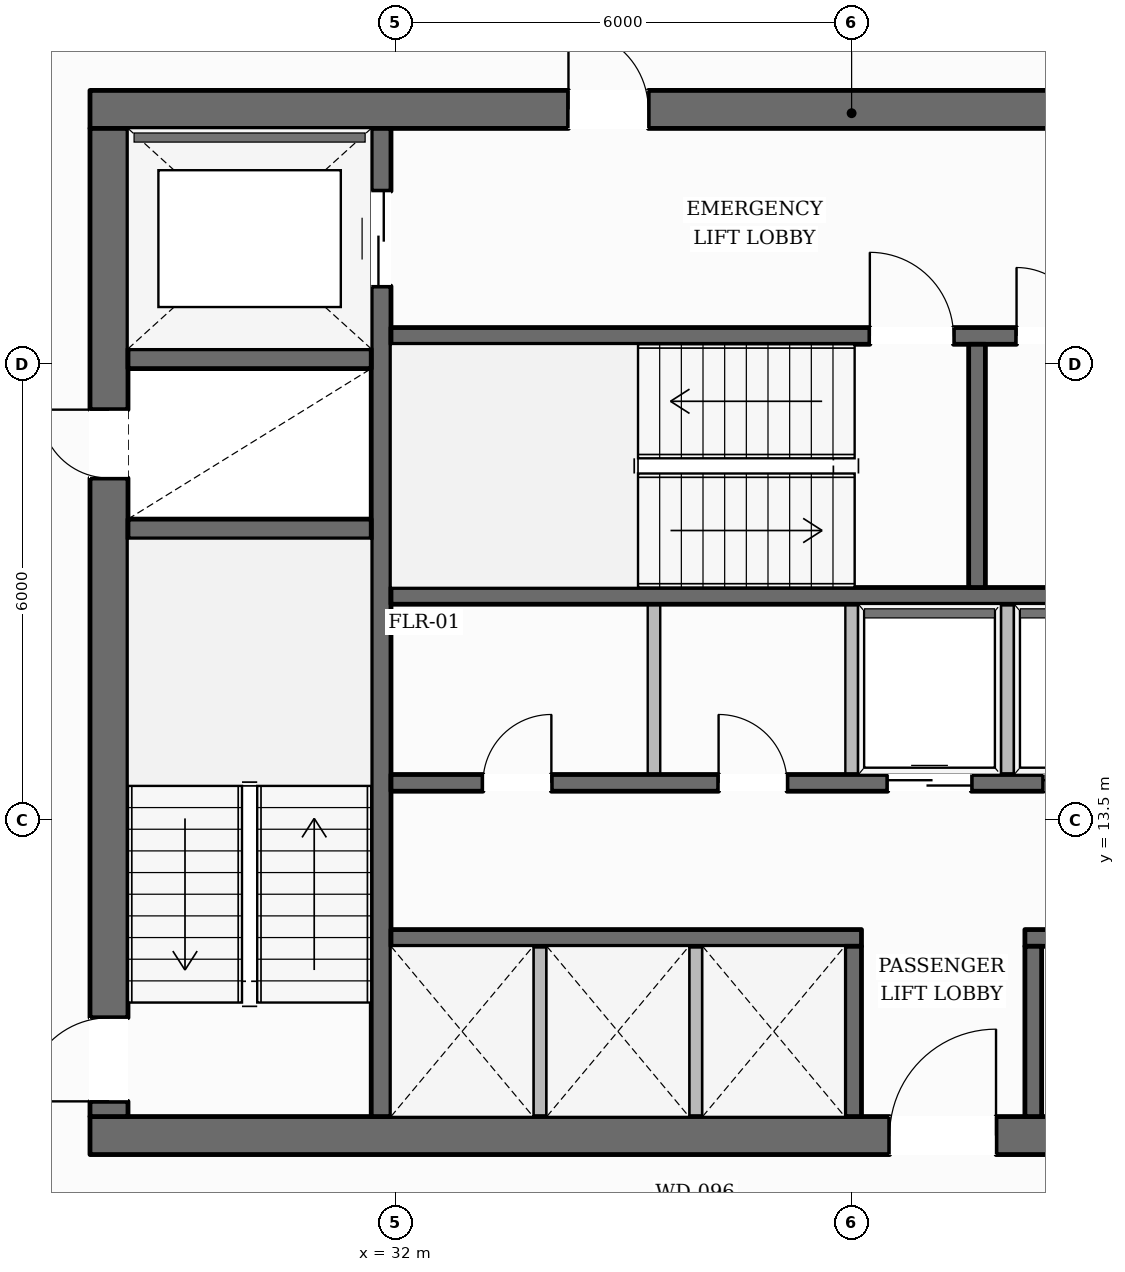
"""IFC4 building model, lengths in metres.
Left out: names, types, materials, properties, quantities, classifications, styles, units other than length and angle.
Written with IfcOpenShell. Run it as: python <this file> out.ifc"""

import sys

from ifc_helpers import new_model, si_unit, direction, frame, frame_2d, origin, place, context, subcontext, project, spatial, rectangle, extrude, element, fill, save


model = new_model("IFC4")
c1 = context("Model", 3, precision=1e-05, world=origin(), true_north=direction((0.0, 1.0)))
c2 = subcontext(c1, "Body", "Model", "MODEL_VIEW")
j1 = project(units=[si_unit("LENGTHUNIT", "METRE"), si_unit("PLANEANGLEUNIT", "RADIAN")], contexts=[c1])
p1 = place(None, origin())
s1 = spatial("IfcSite", under=j1, at=p1, CompositionType="ELEMENT")
p2 = place(p1, origin())
s2 = spatial("IfcBuilding", under=s1, at=p2, CompositionType="ELEMENT")
p3 = place(p2, frame((0.0, 0.0, 139.4)))
s3 = spatial("IfcBuildingStorey", under=s2, at=p3, CompositionType="ELEMENT", Elevation=139.4)
p4 = place(p3, frame((27.98, 9.35, 0.0), z_axis=(0.0, 0.0, 1.0), x_axis=(1.0, 0.0, 0.0)))
e1 = element("IfcWall", 1, at=p4, inside=s3, PredefinedType="SOLIDWALL", context=c2, shape_type="SweptSolid", body=[
    extrude(rectangle(XDim=20.04, YDim=0.5, at=frame_2d((10.02, 0.0))), origin(), (0.0, 0.0, 1.0), 3.6),
])
p5 = place(p4, frame((10.52, 0.0, 0.0)))
e2 = element("IfcOpeningElement", 2, at=p5, cuts=e1, PredefinedType="OPENING", context=c2, shape_type="SweptSolid", body=[
    extrude(rectangle(XDim=1.4, YDim=2.2, at=frame_2d((0.7, 1.1))), frame((0.0, 0.26, 0.0), z_axis=(0.0, -1.0, 0.0), x_axis=(1.0, 0.0, 0.0)), (0.0, 0.0, 1.0), 0.52),
])
p6 = place(p3, frame((27.98, 22.85, 0.0), z_axis=(0.0, 0.0, 1.0), x_axis=(1.0, 0.0, 0.0)))
e3 = element("IfcWall", 3, at=p6, inside=s3, PredefinedType="SOLIDWALL", context=c2, shape_type="SweptSolid", body=[
    extrude(rectangle(XDim=20.04, YDim=0.5, at=frame_2d((10.02, 0.0))), origin(), (0.0, 0.0, 1.0), 3.6),
])
p7 = place(p6, frame((6.295, 0.0, 0.0)))
e4 = element("IfcOpeningElement", 4, at=p7, cuts=e3, PredefinedType="OPENING", context=c2, shape_type="SweptSolid", body=[
    extrude(rectangle(XDim=1.05, YDim=2.15, at=frame_2d((0.525, 1.075))), frame((0.0, 0.26, 0.0), z_axis=(0.0, -1.0, 0.0), x_axis=(1.0, 0.0, 0.0)), (0.0, 0.0, 1.0), 0.52),
])
p8 = place(p6, frame((12.695, 0.0, 0.0)))
e5 = element("IfcOpeningElement", 5, at=p8, cuts=e3, PredefinedType="OPENING", context=c2, shape_type="SweptSolid", body=[
    extrude(rectangle(XDim=1.05, YDim=2.15, at=frame_2d((0.525, 1.075))), frame((0.0, 0.26, 0.0), z_axis=(0.0, -1.0, 0.0), x_axis=(1.0, 0.0, 0.0)), (0.0, 0.0, 1.0), 0.52),
])
p9 = place(p3, frame((28.23, 9.6, 0.0), z_axis=(0.0, 0.0, 1.0), x_axis=(0.0, 1.0, 0.0)))
e6 = element("IfcWall", 6, at=p9, inside=s3, PredefinedType="SOLIDWALL", context=c2, shape_type="SweptSolid", body=[
    extrude(rectangle(XDim=13.0, YDim=0.5, at=frame_2d((6.5, 0.0))), origin(), (0.0, 0.0, 1.0), 3.6),
])
p10 = place(p9, frame((0.2, 0.0, 0.0)))
e7 = element("IfcOpeningElement", 7, at=p10, cuts=e6, PredefinedType="OPENING", context=c2, shape_type="SweptSolid", body=[
    extrude(rectangle(XDim=1.1, YDim=2.15, at=frame_2d((0.55, 1.075))), frame((0.0, 0.26, 0.0), z_axis=(0.0, -1.0, 0.0), x_axis=(1.0, 0.0, 0.0)), (0.0, 0.0, 1.0), 0.52),
])
p11 = place(p9, frame((8.4, 0.0, 0.0)))
e8 = element("IfcOpeningElement", 8, at=p11, cuts=e6, PredefinedType="OPENING", context=c2, shape_type="SweptSolid", body=[
    extrude(rectangle(XDim=0.9, YDim=2.1, at=frame_2d((0.45, 1.05))), frame((0.0, 0.26, 0.0), z_axis=(0.0, -1.0, 0.0), x_axis=(1.0, 0.0, 0.0)), (0.0, 0.0, 1.0), 0.52),
])
p12 = place(p3, frame((31.81, 9.6, 0.0), z_axis=(0.0, 0.0, 1.0), x_axis=(0.0, 1.0, 0.0)))
e9 = element("IfcWall", 9, at=p12, inside=s3, PredefinedType="SHEAR", context=c2, shape_type="SweptSolid", body=[
    extrude(rectangle(XDim=13.0, YDim=0.26, at=frame_2d((6.5, 0.0))), origin(), (0.0, 0.0, 1.0), 3.6),
])
p13 = place(p12, frame((10.925, 0.0, 0.0)))
e10 = element("IfcOpeningElement", 10, at=p13, cuts=e9, PredefinedType="OPENING", context=c2, shape_type="SweptSolid", body=[
    extrude(rectangle(XDim=1.25, YDim=2.25, at=frame_2d((0.625, 1.125))), frame((0.0, 0.14, 0.0), z_axis=(0.0, -1.0, 0.0), x_axis=(1.0, 0.0, 0.0)), (0.0, 0.0, 1.0), 0.28),
])
for number, where, z_axis, x_axis in (
    (11, (28.48, 17.33, 0.0), (0.0, 0.0, 1.0), (1.0, 0.0, 0.0)),
    (12, (28.48, 19.57, 0.0), (0.0, 0.0, 1.0), (1.0, 0.0, 0.0)),
):
    element("IfcWall", number, at=place(p3, frame(where, z_axis=z_axis, x_axis=x_axis)), inside=s3, PredefinedType="SHEAR", context=c2, shape_type="SweptSolid", body=[
        extrude(rectangle(XDim=3.2, YDim=0.26, at=frame_2d((1.6, 0.0))), origin(), (0.0, 0.0, 1.0), 3.6),
    ])
p14 = place(p3, frame((31.94, 19.87, 0.0), z_axis=(0.0, 0.0, 1.0), x_axis=(1.0, 0.0, 0.0)))
e13 = element("IfcWall", 13, at=p14, inside=s3, PredefinedType="SOLIDWALL", context=c2, shape_type="SweptSolid", body=[
    extrude(rectangle(XDim=12.12, YDim=0.22, at=frame_2d((6.06, 0.0))), origin(), (0.0, 0.0, 1.0), 3.6),
])
p15 = place(p14, frame((6.3, 0.0, 0.0)))
e14 = element("IfcOpeningElement", 14, at=p15, cuts=e13, PredefinedType="OPENING", context=c2, shape_type="SweptSolid", body=[
    extrude(rectangle(XDim=1.1, YDim=2.15, at=frame_2d((0.55, 1.075))), frame((0.0, 0.12, 0.0), z_axis=(0.0, -1.0, 0.0), x_axis=(1.0, 0.0, 0.0)), (0.0, 0.0, 1.0), 0.24),
])
p16 = place(p14, frame((8.23, 0.0, 0.0)))
e15 = element("IfcOpeningElement", 15, at=p16, cuts=e13, PredefinedType="OPENING", context=c2, shape_type="SweptSolid", body=[
    extrude(rectangle(XDim=0.9, YDim=2.1, at=frame_2d((0.45, 1.05))), frame((0.0, 0.12, 0.0), z_axis=(0.0, -1.0, 0.0), x_axis=(1.0, 0.0, 0.0)), (0.0, 0.0, 1.0), 0.24),
])
p17 = place(p14, frame((10.45, 0.0, 0.0)))
e16 = element("IfcOpeningElement", 16, at=p17, cuts=e13, PredefinedType="OPENING", context=c2, shape_type="SweptSolid", body=[
    extrude(rectangle(XDim=0.9, YDim=2.1, at=frame_2d((0.45, 1.05))), frame((0.0, 0.12, 0.0), z_axis=(0.0, -1.0, 0.0), x_axis=(1.0, 0.0, 0.0)), (0.0, 0.0, 1.0), 0.24),
])
p18 = place(p3, frame((31.94, 16.45, 0.0), z_axis=(0.0, 0.0, 1.0), x_axis=(1.0, 0.0, 0.0)))
e17 = element("IfcWall", 17, at=p18, inside=s3, PredefinedType="SOLIDWALL", context=c2, shape_type="SweptSolid", body=[
    extrude(rectangle(XDim=12.12, YDim=0.22, at=frame_2d((6.06, 0.0))), origin(), (0.0, 0.0, 1.0), 3.6),
])
p19 = place(p3, frame((39.65, 16.56, 0.0), z_axis=(0.0, 0.0, 1.0), x_axis=(0.0, 1.0, 0.0)))
e18 = element("IfcWall", 18, at=p19, inside=s3, PredefinedType="SOLIDWALL", context=c2, shape_type="SweptSolid", body=[
    extrude(rectangle(XDim=3.2, YDim=0.22, at=frame_2d((1.6, 0.0))), origin(), (0.0, 0.0, 1.0), 3.6),
])
p20 = place(p3, frame((31.94, 13.99, 0.0), z_axis=(0.0, 0.0, 1.0), x_axis=(1.0, 0.0, 0.0)))
e19 = element("IfcWall", 19, at=p20, inside=s3, PredefinedType="SOLIDWALL", context=c2, shape_type="SweptSolid", body=[
    extrude(rectangle(XDim=12.12, YDim=0.22, at=frame_2d((6.06, 0.0))), origin(), (0.0, 0.0, 1.0), 3.6),
])
p21 = place(p20, frame((1.21, 0.0, 0.0)))
e20 = element("IfcOpeningElement", 20, at=p21, cuts=e19, PredefinedType="OPENING", context=c2, shape_type="SweptSolid", body=[
    extrude(rectangle(XDim=0.9, YDim=2.1, at=frame_2d((0.45, 1.05))), frame((0.0, 0.12, 0.0), z_axis=(0.0, -1.0, 0.0), x_axis=(1.0, 0.0, 0.0)), (0.0, 0.0, 1.0), 0.24),
])
p22 = place(p20, frame((4.31, 0.0, 0.0)))
e21 = element("IfcOpeningElement", 21, at=p22, cuts=e19, PredefinedType="OPENING", context=c2, shape_type="SweptSolid", body=[
    extrude(rectangle(XDim=0.9, YDim=2.1, at=frame_2d((0.45, 1.05))), frame((0.0, 0.12, 0.0), z_axis=(0.0, -1.0, 0.0), x_axis=(1.0, 0.0, 0.0)), (0.0, 0.0, 1.0), 0.24),
])
p23 = place(p20, frame((6.535, 0.0, 0.0)))
e22 = element("IfcOpeningElement", 22, at=p23, cuts=e19, PredefinedType="OPENING", context=c2, shape_type="SweptSolid", body=[
    extrude(rectangle(XDim=1.1, YDim=2.2, at=frame_2d((0.55, 1.1))), frame((0.0, 0.12, 0.0), z_axis=(0.0, -1.0, 0.0), x_axis=(1.0, 0.0, 0.0)), (0.0, 0.0, 1.0), 0.24),
])
p24 = place(p20, frame((8.585, 0.0, 0.0)))
e23 = element("IfcOpeningElement", 23, at=p24, cuts=e19, PredefinedType="OPENING", context=c2, shape_type="SweptSolid", body=[
    extrude(rectangle(XDim=1.1, YDim=2.2, at=frame_2d((0.55, 1.1))), frame((0.0, 0.12, 0.0), z_axis=(0.0, -1.0, 0.0), x_axis=(1.0, 0.0, 0.0)), (0.0, 0.0, 1.0), 0.24),
])
p25 = place(p20, frame((10.635, 0.0, 0.0)))
e24 = element("IfcOpeningElement", 24, at=p25, cuts=e19, PredefinedType="OPENING", context=c2, shape_type="SweptSolid", body=[
    extrude(rectangle(XDim=1.1, YDim=2.2, at=frame_2d((0.55, 1.1))), frame((0.0, 0.12, 0.0), z_axis=(0.0, -1.0, 0.0), x_axis=(1.0, 0.0, 0.0)), (0.0, 0.0, 1.0), 0.24),
])
p26 = place(p3, frame((31.94, 11.95, 0.0), z_axis=(0.0, 0.0, 1.0), x_axis=(1.0, 0.0, 0.0)))
e25 = element("IfcWall", 25, at=p26, inside=s3, PredefinedType="SOLIDWALL", context=c2, shape_type="SweptSolid", body=[
    extrude(rectangle(XDim=6.19, YDim=0.22, at=frame_2d((3.095, 0.0))), origin(), (0.0, 0.0, 1.0), 3.6),
])
p27 = place(p3, frame((40.28, 11.95, 0.0), z_axis=(0.0, 0.0, 1.0), x_axis=(1.0, 0.0, 0.0)))
e26 = element("IfcWall", 26, at=p27, inside=s3, PredefinedType="SOLIDWALL", context=c2, shape_type="SweptSolid", body=[
    extrude(rectangle(XDim=3.78, YDim=0.22, at=frame_2d((1.89, 0.0))), origin(), (0.0, 0.0, 1.0), 3.6),
])
p28 = place(p27, frame((1.55, 0.0, 0.0)))
e27 = element("IfcOpeningElement", 27, at=p28, cuts=e26, PredefinedType="OPENING", context=c2, shape_type="SweptSolid", body=[
    extrude(rectangle(XDim=0.9, YDim=2.1, at=frame_2d((0.45, 1.05))), frame((0.0, 0.12, 0.0), z_axis=(0.0, -1.0, 0.0), x_axis=(1.0, 0.0, 0.0)), (0.0, 0.0, 1.0), 0.24),
])
for number, where, z_axis, x_axis in (
    (28, (38.02, 9.6, 0.0), (0.0, 0.0, 1.0), (0.0, 1.0, 0.0)),
    (29, (40.39, 9.6, 0.0), (0.0, 0.0, 1.0), (0.0, 1.0, 0.0)),
):
    element("IfcWall", number, at=place(p3, frame(where, z_axis=z_axis, x_axis=x_axis)), inside=s3, PredefinedType="SOLIDWALL", context=c2, shape_type="SweptSolid", body=[
        extrude(rectangle(XDim=2.24, YDim=0.22, at=frame_2d((1.12, 0.0))), origin(), (0.0, 0.0, 1.0), 3.6),
    ])
p29 = place(p3, frame((13.257, 11.982, 0.0), z_axis=(0.0, 0.0, 1.0), x_axis=(0.506593608381, 0.862184966204, 0.0)))
e30 = element("IfcWall", 30, at=p29, inside=s3, PredefinedType="STANDARD", context=c2, shape_type="SweptSolid", body=[
    extrude(rectangle(XDim=37.828, YDim=0.38, at=frame_2d((18.914, 0.0))), origin(), (0.0, 0.0, 1.0), 3.059),
])
p30 = place(p29, frame((33.507, 0.0, 0.65)))
e31 = element("IfcOpeningElement", 31, at=p30, cuts=e30, PredefinedType="OPENING", context=c2, shape_type="SweptSolid", body=[
    extrude(rectangle(XDim=1.55, YDim=1.75, at=frame_2d((0.775, 0.875))), frame((0.0, 0.2, 0.0), z_axis=(0.0, -1.0, 0.0), x_axis=(1.0, 0.0, 0.0)), (0.0, 0.0, 1.0), 0.4),
])
p31 = place(p29, frame((27.362, 0.0, 0.65)))
e32 = element("IfcOpeningElement", 32, at=p31, cuts=e30, PredefinedType="OPENING", context=c2, shape_type="SweptSolid", body=[
    extrude(rectangle(XDim=1.55, YDim=1.75, at=frame_2d((0.775, 0.875))), frame((0.0, 0.2, 0.0), z_axis=(0.0, -1.0, 0.0), x_axis=(1.0, 0.0, 0.0)), (0.0, 0.0, 1.0), 0.4),
])
p32 = place(p29, frame((15.07, 0.0, 0.65)))
e33 = element("IfcOpeningElement", 33, at=p32, cuts=e30, PredefinedType="OPENING", context=c2, shape_type="SweptSolid", body=[
    extrude(rectangle(XDim=1.55, YDim=1.75, at=frame_2d((0.775, 0.875))), frame((0.0, 0.2, 0.0), z_axis=(0.0, -1.0, 0.0), x_axis=(1.0, 0.0, 0.0)), (0.0, 0.0, 1.0), 0.4),
])
p33 = place(p29, frame((8.924, 0.0, 0.65)))
e34 = element("IfcOpeningElement", 34, at=p33, cuts=e30, PredefinedType="OPENING", context=c2, shape_type="SweptSolid", body=[
    extrude(rectangle(XDim=1.55, YDim=1.75, at=frame_2d((0.775, 0.875))), frame((0.0, 0.2, 0.0), z_axis=(0.0, -1.0, 0.0), x_axis=(1.0, 0.0, 0.0)), (0.0, 0.0, 1.0), 0.4),
])
p34 = place(p29, frame((2.778, 0.0, 0.65)))
e35 = element("IfcOpeningElement", 35, at=p34, cuts=e30, PredefinedType="OPENING", context=c2, shape_type="SweptSolid", body=[
    extrude(rectangle(XDim=1.55, YDim=1.75, at=frame_2d((0.775, 0.875))), frame((0.0, 0.2, 0.0), z_axis=(0.0, -1.0, 0.0), x_axis=(1.0, 0.0, 0.0)), (0.0, 0.0, 1.0), 0.4),
])
for number, where, z_axis, x_axis in (
    (36, (33.9, 9.55, 0.0), (0.0, 0.0, 1.0), (0.0, 1.0, 0.0)),
    (37, (35.95, 9.55, 0.0), (0.0, 0.0, 1.0), (0.0, 1.0, 0.0)),
):
    element("IfcWall", number, at=place(p3, frame(where, z_axis=z_axis, x_axis=x_axis)), inside=s3, PredefinedType="PARTITIONING", context=c2, shape_type="SweptSolid", body=[
        extrude(rectangle(XDim=2.29, YDim=0.165, at=frame_2d((1.145, 0.0))), origin(), (0.0, 0.0, 1.0), 3.6),
    ])
for number, where, z_axis, x_axis in (
    (38, (38.0, 14.1, 0.0), (0.0, 0.0, 1.0), (0.0, 1.0, 0.0)),
    (39, (35.4, 14.1, 0.0), (0.0, 0.0, 1.0), (0.0, 1.0, 0.0)),
    (40, (40.05, 14.1, 0.0), (0.0, 0.0, 1.0), (0.0, 1.0, 0.0)),
):
    element("IfcWall", number, at=place(p3, frame(where, z_axis=z_axis, x_axis=x_axis)), inside=s3, PredefinedType="PARTITIONING", context=c2, shape_type="SweptSolid", body=[
        extrude(rectangle(XDim=2.24, YDim=0.165, at=frame_2d((1.12, 0.0))), origin(), (0.0, 0.0, 1.0), 3.6),
    ])
p35 = place(p10, origin())
e41 = element("IfcDoor", 41, at=p35, inside=s3, OperationType="SINGLE_SWING_LEFT", PredefinedType="DOOR", context=c2, shape_type="SweptSolid", body=[
    extrude(rectangle(XDim=1.1, YDim=2.15, at=frame_2d((0.55, 1.075))), frame((0.0, 0.025, 0.0), z_axis=(0.0, -1.0, 0.0), x_axis=(1.0, 0.0, 0.0)), (0.0, 0.0, 1.0), 0.05),
])
fill(e7, e41)
p36 = place(p15, origin())
e42 = element("IfcDoor", 42, at=p36, inside=s3, OperationType="SINGLE_SWING_LEFT", PredefinedType="DOOR", context=c2, shape_type="SweptSolid", body=[
    extrude(rectangle(XDim=1.1, YDim=2.15, at=frame_2d((0.55, 1.075))), frame((0.0, 0.025, 0.0), z_axis=(0.0, -1.0, 0.0), x_axis=(1.0, 0.0, 0.0)), (0.0, 0.0, 1.0), 0.05),
])
fill(e14, e42)
p37 = place(p11, origin())
e43 = element("IfcDoor", 43, at=p37, inside=s3, OperationType="SINGLE_SWING_RIGHT", PredefinedType="DOOR", context=c2, shape_type="SweptSolid", body=[
    extrude(rectangle(XDim=0.9, YDim=2.1, at=frame_2d((0.45, 1.05))), frame((0.0, 0.025, 0.0), z_axis=(0.0, -1.0, 0.0), x_axis=(1.0, 0.0, 0.0)), (0.0, 0.0, 1.0), 0.05),
])
fill(e8, e43)
p38 = place(p7, origin())
e44 = element("IfcDoor", 44, at=p38, inside=s3, OperationType="SINGLE_SWING_LEFT", PredefinedType="DOOR", context=c2, shape_type="SweptSolid", body=[
    extrude(rectangle(XDim=1.05, YDim=2.15, at=frame_2d((0.525, 1.075))), frame((0.0, 0.025, 0.0), z_axis=(0.0, -1.0, 0.0), x_axis=(1.0, 0.0, 0.0)), (0.0, 0.0, 1.0), 0.05),
])
fill(e4, e44)
p39 = place(p13, origin())
e45 = element("IfcDoor", 45, at=p39, inside=s3, OperationType="DOUBLE_DOOR_SLIDING", PredefinedType="DOOR", context=c2, shape_type="SweptSolid", body=[
    extrude(rectangle(XDim=1.25, YDim=2.25, at=frame_2d((0.625, 1.125))), frame((0.0, 0.025, 0.0), z_axis=(0.0, -1.0, 0.0), x_axis=(1.0, 0.0, 0.0)), (0.0, 0.0, 1.0), 0.05),
])
fill(e10, e45)
p40 = place(p5, origin())
e46 = element("IfcDoor", 46, at=p40, inside=s3, OperationType="SINGLE_SWING_RIGHT", PredefinedType="DOOR", context=c2, shape_type="SweptSolid", body=[
    extrude(rectangle(XDim=1.4, YDim=2.2, at=frame_2d((0.7, 1.1))), frame((0.0, 0.025, 0.0), z_axis=(0.0, -1.0, 0.0), x_axis=(1.0, 0.0, 0.0)), (0.0, 0.0, 1.0), 0.05),
])
fill(e2, e46)
p41 = place(p21, origin())
e47 = element("IfcDoor", 47, at=p41, inside=s3, OperationType="SINGLE_SWING_RIGHT", PredefinedType="DOOR", context=c2, shape_type="SweptSolid", body=[
    extrude(rectangle(XDim=0.9, YDim=2.1, at=frame_2d((0.45, 1.05))), frame((0.0, 0.025, 0.0), z_axis=(0.0, -1.0, 0.0), x_axis=(1.0, 0.0, 0.0)), (0.0, 0.0, 1.0), 0.05),
])
fill(e20, e47)
p42 = place(p22, origin())
e48 = element("IfcDoor", 48, at=p42, inside=s3, OperationType="SINGLE_SWING_LEFT", PredefinedType="DOOR", context=c2, shape_type="SweptSolid", body=[
    extrude(rectangle(XDim=0.9, YDim=2.1, at=frame_2d((0.45, 1.05))), frame((0.0, 0.025, 0.0), z_axis=(0.0, -1.0, 0.0), x_axis=(1.0, 0.0, 0.0)), (0.0, 0.0, 1.0), 0.05),
])
fill(e21, e48)
p43 = place(p23, origin())
e49 = element("IfcDoor", 49, at=p43, inside=s3, OperationType="DOUBLE_DOOR_SLIDING", PredefinedType="DOOR", context=c2, shape_type="SweptSolid", body=[
    extrude(rectangle(XDim=1.1, YDim=2.2, at=frame_2d((0.55, 1.1))), frame((0.0, 0.025, 0.0), z_axis=(0.0, -1.0, 0.0), x_axis=(1.0, 0.0, 0.0)), (0.0, 0.0, 1.0), 0.05),
])
fill(e22, e49)
p44 = place(p24, origin())
e50 = element("IfcDoor", 50, at=p44, inside=s3, OperationType="DOUBLE_DOOR_SLIDING", PredefinedType="DOOR", context=c2, shape_type="SweptSolid", body=[
    extrude(rectangle(XDim=1.1, YDim=2.2, at=frame_2d((0.55, 1.1))), frame((0.0, 0.025, 0.0), z_axis=(0.0, -1.0, 0.0), x_axis=(1.0, 0.0, 0.0)), (0.0, 0.0, 1.0), 0.05),
])
fill(e23, e50)
p45 = place(p16, origin())
e51 = element("IfcDoor", 51, at=p45, inside=s3, OperationType="SINGLE_SWING_LEFT", PredefinedType="DOOR", context=c2, shape_type="SweptSolid", body=[
    extrude(rectangle(XDim=0.9, YDim=2.1, at=frame_2d((0.45, 1.05))), frame((0.0, 0.025, 0.0), z_axis=(0.0, -1.0, 0.0), x_axis=(1.0, 0.0, 0.0)), (0.0, 0.0, 1.0), 0.05),
])
fill(e15, e51)
save(model, sys.argv[1])
